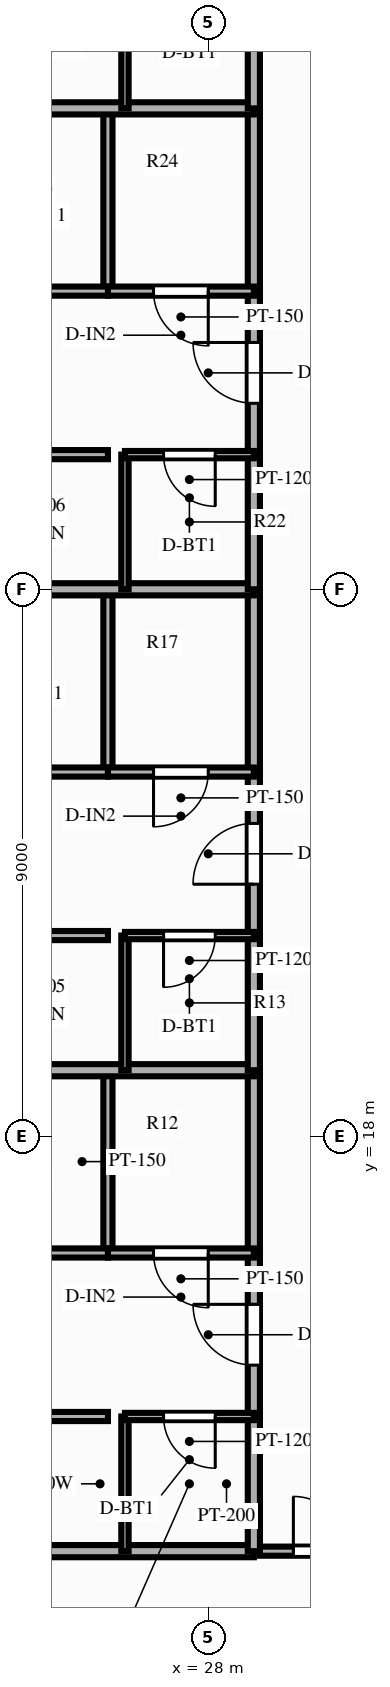
"""IFC4 building model, lengths in metres.
Left out: names, types, materials, properties, quantities, classifications, styles, units other than length and angle.
Written with IfcOpenShell. Run it as: python <this file> out.ifc"""

import sys

from ifc_helpers import new_model, si_unit, direction, frame, frame_2d, origin, place, context, subcontext, project, spatial, rectangle, extrude, source, transform, mapped, element, fill, save


model = new_model("IFC4")
c1 = context("Model", 3, precision=1e-05, world=origin(), true_north=direction((0.0, 1.0)))
c2 = subcontext(c1, "Body", "Model", "MODEL_VIEW")
j1 = project(units=[si_unit("LENGTHUNIT", "METRE"), si_unit("PLANEANGLEUNIT", "RADIAN")], contexts=[c1])
p1 = place(None, origin())
s1 = spatial("IfcSite", under=j1, at=p1, CompositionType="ELEMENT")
p2 = place(p1, origin())
s2 = spatial("IfcBuilding", under=s1, at=p2, CompositionType="ELEMENT")
p3 = place(p2, frame((0.0, 0.0, 189.7)))
s3 = spatial("IfcBuildingStorey", under=s2, at=p3, CompositionType="ELEMENT", Elevation=189.7)
p4 = place(p3, frame((28.85, 11.18, 0.0), z_axis=(0.0, 0.0, 1.0), x_axis=(1.0, 0.0, 0.0)))
e1 = element("IfcWall", 1, at=p4, inside=s3, PredefinedType="PARTITIONING", context=c2, shape_type="SweptSolid", body=[
    extrude(rectangle(XDim=2.33, YDim=0.15, at=frame_2d((1.165, 0.0))), origin(), (0.0, 0.0, 1.0), 2.79),
])
p5 = place(p4, frame((0.55, 0.0, 0.0)))
e2 = element("IfcOpeningElement", 2, at=p5, cuts=e1, PredefinedType="OPENING", context=c2, shape_type="SweptSolid", body=[
    extrude(rectangle(XDim=0.9, YDim=2.1, at=frame_2d((0.45, 1.05))), frame((0.0, 0.087, 0.0), z_axis=(0.0, -1.0, 0.0), x_axis=(1.0, 0.0, 0.0)), (0.0, 0.0, 1.0), 0.174),
])
p6 = place(p3, frame((28.75, 11.18, 0.0), z_axis=(0.0, 0.0, 1.0), x_axis=(-1.0, 0.0, 0.0)))
e3 = element("IfcWall", 3, at=p6, inside=s3, PredefinedType="PARTITIONING", context=c2, shape_type="SweptSolid", body=[
    extrude(rectangle(XDim=10.85, YDim=0.2, at=frame_2d((5.425, 0.0))), origin(), (0.0, 0.0, 1.0), 2.79),
])
p7 = place(p3, frame((28.75, 11.18, 0.0), z_axis=(0.0, 0.0, 1.0), x_axis=(0.0, 1.0, 0.0)))
e4 = element("IfcWall", 4, at=p7, inside=s3, PredefinedType="PARTITIONING", context=c2, shape_type="SweptSolid", body=[
    extrude(rectangle(XDim=2.215, YDim=0.2, at=frame_2d((1.107, 0.0))), origin(), (0.0, 0.0, 1.0), 2.79),
])
p8 = place(p3, frame((28.75, 13.395, 0.0), z_axis=(0.0, 0.0, 1.0), x_axis=(0.0, 1.0, 0.0)))
e5 = element("IfcWall", 5, at=p8, inside=s3, PredefinedType="PARTITIONING", context=c2, shape_type="SweptSolid", body=[
    extrude(rectangle(XDim=2.689, YDim=0.2, at=frame_2d((1.345, 0.0))), origin(), (0.0, 0.0, 1.0), 2.79),
])
p9 = place(p8, frame((0.845, 0.0, 0.0)))
e6 = element("IfcOpeningElement", 6, at=p9, cuts=e5, PredefinedType="OPENING", context=c2, shape_type="SweptSolid", body=[
    extrude(rectangle(XDim=1.0, YDim=2.15, at=frame_2d((0.5, 1.075))), frame((0.0, 0.112, 0.0), z_axis=(0.0, -1.0, 0.0), x_axis=(1.0, 0.0, 0.0)), (0.0, 0.0, 1.0), 0.224),
])
p10 = place(p3, frame((28.75, 16.084, 0.0), z_axis=(0.0, 0.0, 1.0), x_axis=(0.0, 1.0, 0.0)))
e7 = element("IfcWall", 7, at=p10, inside=s3, PredefinedType="PARTITIONING", context=c2, shape_type="SweptSolid", body=[
    extrude(rectangle(XDim=3.006, YDim=0.2, at=frame_2d((1.503, 0.0))), origin(), (0.0, 0.0, 1.0), 2.79),
])
p11 = place(p3, frame((26.63, 11.18, 0.0), z_axis=(0.0, 0.0, 1.0), x_axis=(0.0, 1.0, 0.0)))
e8 = element("IfcWall", 8, at=p11, inside=s3, PredefinedType="PARTITIONING", context=c2, shape_type="SweptSolid", body=[
    extrude(rectangle(XDim=2.215, YDim=0.12, at=frame_2d((1.107, 0.0))), origin(), (0.0, 0.0, 1.0), 2.79),
])
p12 = place(p3, frame((26.35, 16.084, 0.0), z_axis=(0.0, 0.0, 1.0), x_axis=(0.0, 1.0, 0.0)))
e9 = element("IfcWall", 9, at=p12, inside=s3, PredefinedType="PARTITIONING", context=c2, shape_type="SweptSolid", body=[
    extrude(rectangle(XDim=3.006, YDim=0.15, at=frame_2d((1.503, 0.0))), origin(), (0.0, 0.0, 1.0), 2.79),
])
p13 = place(p3, frame((28.75, 13.395, 0.0), z_axis=(0.0, 0.0, 1.0), x_axis=(-1.0, 0.0, 0.0)))
e10 = element("IfcWall", 10, at=p13, inside=s3, PredefinedType="PARTITIONING", context=c2, shape_type="SweptSolid", body=[
    extrude(rectangle(XDim=2.12, YDim=0.12, at=frame_2d((1.06, 0.0))), origin(), (0.0, 0.0, 1.0), 2.79),
])
p14 = place(p13, frame((0.635, 0.0, 0.0)))
e11 = element("IfcOpeningElement", 11, at=p14, cuts=e10, PredefinedType="OPENING", context=c2, shape_type="SweptSolid", body=[
    extrude(rectangle(XDim=0.85, YDim=2.05, at=frame_2d((0.425, 1.025))), frame((0.0, 0.072, 0.0), z_axis=(0.0, -1.0, 0.0), x_axis=(1.0, 0.0, 0.0)), (0.0, 0.0, 1.0), 0.144),
])
p15 = place(p3, frame((26.35, 13.395, 0.0), z_axis=(0.0, 0.0, 1.0), x_axis=(-1.0, 0.0, 0.0)))
e12 = element("IfcWall", 12, at=p15, inside=s3, PredefinedType="PARTITIONING", context=c2, shape_type="SweptSolid", body=[
    extrude(rectangle(XDim=8.45, YDim=0.15, at=frame_2d((4.225, 0.0))), origin(), (0.0, 0.0, 1.0), 2.79),
])
p16 = place(p15, frame((3.48, 0.0, 0.0)))
e13 = element("IfcOpeningElement", 13, at=p16, cuts=e12, PredefinedType="OPENING", context=c2, shape_type="SweptSolid", body=[
    extrude(rectangle(XDim=0.9, YDim=2.1, at=frame_2d((0.45, 1.05))), frame((0.0, 0.087, 0.0), z_axis=(0.0, -1.0, 0.0), x_axis=(1.0, 0.0, 0.0)), (0.0, 0.0, 1.0), 0.174),
])
p17 = place(p3, frame((28.75, 16.084, 0.0), z_axis=(0.0, 0.0, 1.0), x_axis=(-1.0, 0.0, 0.0)))
e14 = element("IfcWall", 14, at=p17, inside=s3, PredefinedType="PARTITIONING", context=c2, shape_type="SweptSolid", body=[
    extrude(rectangle(XDim=2.4, YDim=0.15, at=frame_2d((1.2, 0.0))), origin(), (0.0, 0.0, 1.0), 2.79),
])
p18 = place(p17, frame((0.75, 0.0, 0.0)))
e15 = element("IfcOpeningElement", 15, at=p18, cuts=e14, PredefinedType="OPENING", context=c2, shape_type="SweptSolid", body=[
    extrude(rectangle(XDim=0.9, YDim=2.1, at=frame_2d((0.45, 1.05))), frame((0.0, 0.087, 0.0), z_axis=(0.0, -1.0, 0.0), x_axis=(1.0, 0.0, 0.0)), (0.0, 0.0, 1.0), 0.174),
])
p19 = place(p3, frame((26.35, 16.084, 0.0), z_axis=(0.0, 0.0, 1.0), x_axis=(-1.0, 0.0, 0.0)))
e16 = element("IfcWall", 16, at=p19, inside=s3, PredefinedType="PARTITIONING", context=c2, shape_type="SweptSolid", body=[
    extrude(rectangle(XDim=8.45, YDim=0.15, at=frame_2d((4.225, 0.0))), origin(), (0.0, 0.0, 1.0), 2.79),
])
p20 = place(p19, frame((3.48, 0.0, 0.0)))
e17 = element("IfcOpeningElement", 17, at=p20, cuts=e16, PredefinedType="OPENING", context=c2, shape_type="SweptSolid", body=[
    extrude(rectangle(XDim=0.9, YDim=2.1, at=frame_2d((0.45, 1.05))), frame((0.0, 0.087, 0.0), z_axis=(0.0, -1.0, 0.0), x_axis=(1.0, 0.0, 0.0)), (0.0, 0.0, 1.0), 0.174),
])
p21 = place(p3, frame((28.75, 19.09, 0.0), z_axis=(0.0, 0.0, 1.0), x_axis=(-1.0, 0.0, 0.0)))
e18 = element("IfcWall", 18, at=p21, inside=s3, PredefinedType="PARTITIONING", context=c2, shape_type="SweptSolid", body=[
    extrude(rectangle(XDim=10.85, YDim=0.2, at=frame_2d((5.425, 0.0))), origin(), (0.0, 0.0, 1.0), 2.79),
])
p22 = place(p3, frame((28.75, 19.09, 0.0), z_axis=(0.0, 0.0, 1.0), x_axis=(0.0, 1.0, 0.0)))
e19 = element("IfcWall", 19, at=p22, inside=s3, PredefinedType="PARTITIONING", context=c2, shape_type="SweptSolid", body=[
    extrude(rectangle(XDim=2.215, YDim=0.2, at=frame_2d((1.107, 0.0))), origin(), (0.0, 0.0, 1.0), 2.79),
])
p23 = place(p3, frame((28.75, 21.305, 0.0), z_axis=(0.0, 0.0, 1.0), x_axis=(0.0, 1.0, 0.0)))
e20 = element("IfcWall", 20, at=p23, inside=s3, PredefinedType="PARTITIONING", context=c2, shape_type="SweptSolid", body=[
    extrude(rectangle(XDim=2.689, YDim=0.2, at=frame_2d((1.345, 0.0))), origin(), (0.0, 0.0, 1.0), 2.79),
])
p24 = place(p23, frame((0.845, 0.0, 0.0)))
e21 = element("IfcOpeningElement", 21, at=p24, cuts=e20, PredefinedType="OPENING", context=c2, shape_type="SweptSolid", body=[
    extrude(rectangle(XDim=1.0, YDim=2.15, at=frame_2d((0.5, 1.075))), frame((0.0, 0.112, 0.0), z_axis=(0.0, -1.0, 0.0), x_axis=(1.0, 0.0, 0.0)), (0.0, 0.0, 1.0), 0.224),
])
p25 = place(p3, frame((28.75, 23.994, 0.0), z_axis=(0.0, 0.0, 1.0), x_axis=(0.0, 1.0, 0.0)))
e22 = element("IfcWall", 22, at=p25, inside=s3, PredefinedType="PARTITIONING", context=c2, shape_type="SweptSolid", body=[
    extrude(rectangle(XDim=3.006, YDim=0.2, at=frame_2d((1.503, 0.0))), origin(), (0.0, 0.0, 1.0), 2.79),
])
p26 = place(p3, frame((26.63, 19.09, 0.0), z_axis=(0.0, 0.0, 1.0), x_axis=(0.0, 1.0, 0.0)))
e23 = element("IfcWall", 23, at=p26, inside=s3, PredefinedType="PARTITIONING", context=c2, shape_type="SweptSolid", body=[
    extrude(rectangle(XDim=2.215, YDim=0.12, at=frame_2d((1.107, 0.0))), origin(), (0.0, 0.0, 1.0), 2.79),
])
p27 = place(p3, frame((26.35, 23.994, 0.0), z_axis=(0.0, 0.0, 1.0), x_axis=(0.0, 1.0, 0.0)))
e24 = element("IfcWall", 24, at=p27, inside=s3, PredefinedType="PARTITIONING", context=c2, shape_type="SweptSolid", body=[
    extrude(rectangle(XDim=3.006, YDim=0.15, at=frame_2d((1.503, 0.0))), origin(), (0.0, 0.0, 1.0), 2.79),
])
p28 = place(p3, frame((28.75, 21.305, 0.0), z_axis=(0.0, 0.0, 1.0), x_axis=(-1.0, 0.0, 0.0)))
e25 = element("IfcWall", 25, at=p28, inside=s3, PredefinedType="PARTITIONING", context=c2, shape_type="SweptSolid", body=[
    extrude(rectangle(XDim=2.12, YDim=0.12, at=frame_2d((1.06, 0.0))), origin(), (0.0, 0.0, 1.0), 2.79),
])
p29 = place(p28, frame((0.635, 0.0, 0.0)))
e26 = element("IfcOpeningElement", 26, at=p29, cuts=e25, PredefinedType="OPENING", context=c2, shape_type="SweptSolid", body=[
    extrude(rectangle(XDim=0.85, YDim=2.05, at=frame_2d((0.425, 1.025))), frame((0.0, 0.072, 0.0), z_axis=(0.0, -1.0, 0.0), x_axis=(1.0, 0.0, 0.0)), (0.0, 0.0, 1.0), 0.144),
])
p30 = place(p3, frame((26.35, 21.305, 0.0), z_axis=(0.0, 0.0, 1.0), x_axis=(-1.0, 0.0, 0.0)))
e27 = element("IfcWall", 27, at=p30, inside=s3, PredefinedType="PARTITIONING", context=c2, shape_type="SweptSolid", body=[
    extrude(rectangle(XDim=8.45, YDim=0.15, at=frame_2d((4.225, 0.0))), origin(), (0.0, 0.0, 1.0), 2.79),
])
p31 = place(p30, frame((3.48, 0.0, 0.0)))
e28 = element("IfcOpeningElement", 28, at=p31, cuts=e27, PredefinedType="OPENING", context=c2, shape_type="SweptSolid", body=[
    extrude(rectangle(XDim=0.9, YDim=2.1, at=frame_2d((0.45, 1.05))), frame((0.0, 0.087, 0.0), z_axis=(0.0, -1.0, 0.0), x_axis=(1.0, 0.0, 0.0)), (0.0, 0.0, 1.0), 0.174),
])
p32 = place(p3, frame((28.75, 23.994, 0.0), z_axis=(0.0, 0.0, 1.0), x_axis=(-1.0, 0.0, 0.0)))
e29 = element("IfcWall", 29, at=p32, inside=s3, PredefinedType="PARTITIONING", context=c2, shape_type="SweptSolid", body=[
    extrude(rectangle(XDim=2.4, YDim=0.15, at=frame_2d((1.2, 0.0))), origin(), (0.0, 0.0, 1.0), 2.79),
])
p33 = place(p32, frame((0.75, 0.0, 0.0)))
e30 = element("IfcOpeningElement", 30, at=p33, cuts=e29, PredefinedType="OPENING", context=c2, shape_type="SweptSolid", body=[
    extrude(rectangle(XDim=0.9, YDim=2.1, at=frame_2d((0.45, 1.05))), frame((0.0, 0.087, 0.0), z_axis=(0.0, -1.0, 0.0), x_axis=(1.0, 0.0, 0.0)), (0.0, 0.0, 1.0), 0.174),
])
p34 = place(p3, frame((26.35, 23.994, 0.0), z_axis=(0.0, 0.0, 1.0), x_axis=(-1.0, 0.0, 0.0)))
e31 = element("IfcWall", 31, at=p34, inside=s3, PredefinedType="PARTITIONING", context=c2, shape_type="SweptSolid", body=[
    extrude(rectangle(XDim=8.45, YDim=0.15, at=frame_2d((4.225, 0.0))), origin(), (0.0, 0.0, 1.0), 2.79),
])
p35 = place(p34, frame((3.48, 0.0, 0.0)))
e32 = element("IfcOpeningElement", 32, at=p35, cuts=e31, PredefinedType="OPENING", context=c2, shape_type="SweptSolid", body=[
    extrude(rectangle(XDim=0.9, YDim=2.1, at=frame_2d((0.45, 1.05))), frame((0.0, 0.087, 0.0), z_axis=(0.0, -1.0, 0.0), x_axis=(1.0, 0.0, 0.0)), (0.0, 0.0, 1.0), 0.174),
])
p36 = place(p3, frame((28.75, 27.0, 0.0), z_axis=(0.0, 0.0, 1.0), x_axis=(-1.0, 0.0, 0.0)))
e33 = element("IfcWall", 33, at=p36, inside=s3, PredefinedType="PARTITIONING", context=c2, shape_type="SweptSolid", body=[
    extrude(rectangle(XDim=10.85, YDim=0.2, at=frame_2d((5.425, 0.0))), origin(), (0.0, 0.0, 1.0), 2.79),
])
p37 = place(p3, frame((28.75, 27.0, 0.0), z_axis=(0.0, 0.0, 1.0), x_axis=(0.0, 1.0, 0.0)))
e34 = element("IfcWall", 34, at=p37, inside=s3, PredefinedType="PARTITIONING", context=c2, shape_type="SweptSolid", body=[
    extrude(rectangle(XDim=2.215, YDim=0.2, at=frame_2d((1.107, 0.0))), origin(), (0.0, 0.0, 1.0), 2.79),
])
p38 = place(p3, frame((28.75, 29.215, 0.0), z_axis=(0.0, 0.0, 1.0), x_axis=(0.0, 1.0, 0.0)))
e35 = element("IfcWall", 35, at=p38, inside=s3, PredefinedType="PARTITIONING", context=c2, shape_type="SweptSolid", body=[
    extrude(rectangle(XDim=2.689, YDim=0.2, at=frame_2d((1.345, 0.0))), origin(), (0.0, 0.0, 1.0), 2.79),
])
p39 = place(p38, frame((0.845, 0.0, 0.0)))
e36 = element("IfcOpeningElement", 36, at=p39, cuts=e35, PredefinedType="OPENING", context=c2, shape_type="SweptSolid", body=[
    extrude(rectangle(XDim=1.0, YDim=2.15, at=frame_2d((0.5, 1.075))), frame((0.0, 0.112, 0.0), z_axis=(0.0, -1.0, 0.0), x_axis=(1.0, 0.0, 0.0)), (0.0, 0.0, 1.0), 0.224),
])
p40 = place(p3, frame((28.75, 31.904, 0.0), z_axis=(0.0, 0.0, 1.0), x_axis=(0.0, 1.0, 0.0)))
e37 = element("IfcWall", 37, at=p40, inside=s3, PredefinedType="PARTITIONING", context=c2, shape_type="SweptSolid", body=[
    extrude(rectangle(XDim=3.006, YDim=0.2, at=frame_2d((1.503, 0.0))), origin(), (0.0, 0.0, 1.0), 2.79),
])
p41 = place(p3, frame((26.63, 27.0, 0.0), z_axis=(0.0, 0.0, 1.0), x_axis=(0.0, 1.0, 0.0)))
e38 = element("IfcWall", 38, at=p41, inside=s3, PredefinedType="PARTITIONING", context=c2, shape_type="SweptSolid", body=[
    extrude(rectangle(XDim=2.215, YDim=0.12, at=frame_2d((1.107, 0.0))), origin(), (0.0, 0.0, 1.0), 2.79),
])
p42 = place(p3, frame((26.35, 31.904, 0.0), z_axis=(0.0, 0.0, 1.0), x_axis=(0.0, 1.0, 0.0)))
e39 = element("IfcWall", 39, at=p42, inside=s3, PredefinedType="PARTITIONING", context=c2, shape_type="SweptSolid", body=[
    extrude(rectangle(XDim=3.006, YDim=0.15, at=frame_2d((1.503, 0.0))), origin(), (0.0, 0.0, 1.0), 2.79),
])
p43 = place(p3, frame((28.75, 29.215, 0.0), z_axis=(0.0, 0.0, 1.0), x_axis=(-1.0, 0.0, 0.0)))
e40 = element("IfcWall", 40, at=p43, inside=s3, PredefinedType="PARTITIONING", context=c2, shape_type="SweptSolid", body=[
    extrude(rectangle(XDim=2.12, YDim=0.12, at=frame_2d((1.06, 0.0))), origin(), (0.0, 0.0, 1.0), 2.79),
])
p44 = place(p43, frame((0.635, 0.0, 0.0)))
e41 = element("IfcOpeningElement", 41, at=p44, cuts=e40, PredefinedType="OPENING", context=c2, shape_type="SweptSolid", body=[
    extrude(rectangle(XDim=0.85, YDim=2.05, at=frame_2d((0.425, 1.025))), frame((0.0, 0.072, 0.0), z_axis=(0.0, -1.0, 0.0), x_axis=(1.0, 0.0, 0.0)), (0.0, 0.0, 1.0), 0.144),
])
p45 = place(p3, frame((26.35, 29.215, 0.0), z_axis=(0.0, 0.0, 1.0), x_axis=(-1.0, 0.0, 0.0)))
e42 = element("IfcWall", 42, at=p45, inside=s3, PredefinedType="PARTITIONING", context=c2, shape_type="SweptSolid", body=[
    extrude(rectangle(XDim=8.45, YDim=0.15, at=frame_2d((4.225, 0.0))), origin(), (0.0, 0.0, 1.0), 2.79),
])
p46 = place(p45, frame((3.48, 0.0, 0.0)))
e43 = element("IfcOpeningElement", 43, at=p46, cuts=e42, PredefinedType="OPENING", context=c2, shape_type="SweptSolid", body=[
    extrude(rectangle(XDim=0.9, YDim=2.1, at=frame_2d((0.45, 1.05))), frame((0.0, 0.087, 0.0), z_axis=(0.0, -1.0, 0.0), x_axis=(1.0, 0.0, 0.0)), (0.0, 0.0, 1.0), 0.174),
])
p47 = place(p3, frame((28.75, 31.904, 0.0), z_axis=(0.0, 0.0, 1.0), x_axis=(-1.0, 0.0, 0.0)))
e44 = element("IfcWall", 44, at=p47, inside=s3, PredefinedType="PARTITIONING", context=c2, shape_type="SweptSolid", body=[
    extrude(rectangle(XDim=2.4, YDim=0.15, at=frame_2d((1.2, 0.0))), origin(), (0.0, 0.0, 1.0), 2.39),
])
p48 = place(p47, frame((0.75, 0.0, 0.0)))
e45 = element("IfcOpeningElement", 45, at=p48, cuts=e44, PredefinedType="OPENING", context=c2, shape_type="SweptSolid", body=[
    extrude(rectangle(XDim=0.9, YDim=2.1, at=frame_2d((0.45, 1.05))), frame((0.0, 0.087, 0.0), z_axis=(0.0, -1.0, 0.0), x_axis=(1.0, 0.0, 0.0)), (0.0, 0.0, 1.0), 0.174),
])
p49 = place(p3, frame((26.35, 31.904, 0.0), z_axis=(0.0, 0.0, 1.0), x_axis=(-1.0, 0.0, 0.0)))
e46 = element("IfcWall", 46, at=p49, inside=s3, PredefinedType="PARTITIONING", context=c2, shape_type="SweptSolid", body=[
    extrude(rectangle(XDim=8.45, YDim=0.15, at=frame_2d((4.225, 0.0))), origin(), (0.0, 0.0, 1.0), 2.39),
])
p50 = place(p49, frame((3.48, 0.0, 0.0)))
e47 = element("IfcOpeningElement", 47, at=p50, cuts=e46, PredefinedType="OPENING", context=c2, shape_type="SweptSolid", body=[
    extrude(rectangle(XDim=0.9, YDim=2.1, at=frame_2d((0.45, 1.05))), frame((0.0, 0.087, 0.0), z_axis=(0.0, -1.0, 0.0), x_axis=(1.0, 0.0, 0.0)), (0.0, 0.0, 1.0), 0.174),
])
p51 = place(p3, frame((28.75, 34.91, 0.0), z_axis=(0.0, 0.0, 1.0), x_axis=(-1.0, 0.0, 0.0)))
e48 = element("IfcWall", 48, at=p51, inside=s3, PredefinedType="PARTITIONING", context=c2, shape_type="SweptSolid", body=[
    extrude(rectangle(XDim=10.85, YDim=0.2, at=frame_2d((5.425, 0.0))), origin(), (0.0, 0.0, 1.0), 2.79),
])
p52 = place(p3, frame((28.75, 34.91, 0.0), z_axis=(0.0, 0.0, 1.0), x_axis=(0.0, 1.0, 0.0)))
e49 = element("IfcWall", 49, at=p52, inside=s3, PredefinedType="PARTITIONING", context=c2, shape_type="SweptSolid", body=[
    extrude(rectangle(XDim=2.41, YDim=0.2, at=frame_2d((1.205, 0.0))), origin(), (0.0, 0.0, 1.0), 2.79),
])
p53 = place(p3, frame((26.63, 34.91, 0.0), z_axis=(0.0, 0.0, 1.0), x_axis=(0.0, 1.0, 0.0)))
e50 = element("IfcWall", 50, at=p53, inside=s3, PredefinedType="PARTITIONING", context=c2, shape_type="SweptSolid", body=[
    extrude(rectangle(XDim=2.41, YDim=0.12, at=frame_2d((1.205, 0.0))), origin(), (0.0, 0.0, 1.0), 2.79),
])
m1 = source(origin(), c2, "Body", "SweptSolid", [
    extrude(rectangle(XDim=0.9, YDim=2.1, at=frame_2d((0.45, 1.05))), frame((0.0, 0.025, 0.0), z_axis=(0.0, -1.0, 0.0), x_axis=(1.0, 0.0, 0.0)), (0.0, 0.0, 1.0), 0.05),
])
p54 = place(p5, origin())
e51 = element("IfcDoor", 51, at=p54, inside=s3, OperationType="SINGLE_SWING_LEFT", PredefinedType="DOOR", context=c2, shape_type="MappedRepresentation", body=[
    mapped(m1, transform((0.0, 0.0, 0.0), scale=1.0)),
])
fill(e2, e51)
m2 = source(origin(), c2, "Body", "SweptSolid", [
    extrude(rectangle(XDim=1.0, YDim=2.15, at=frame_2d((0.5, 1.075))), frame((0.0, 0.025, 0.0), z_axis=(0.0, -1.0, 0.0), x_axis=(1.0, 0.0, 0.0)), (0.0, 0.0, 1.0), 0.05),
])
p55 = place(p9, origin())
e52 = element("IfcDoor", 52, at=p55, inside=s3, OperationType="SINGLE_SWING_RIGHT", PredefinedType="DOOR", context=c2, shape_type="MappedRepresentation", body=[
    mapped(m2, transform((0.0, 0.0, 0.0), scale=1.0)),
])
fill(e6, e52)
m3 = source(origin(), c2, "Body", "SweptSolid", [
    extrude(rectangle(XDim=0.85, YDim=2.05, at=frame_2d((0.425, 1.025))), frame((0.0, 0.025, 0.0), z_axis=(0.0, -1.0, 0.0), x_axis=(1.0, 0.0, 0.0)), (0.0, 0.0, 1.0), 0.05),
])
p56 = place(p14, origin())
e53 = element("IfcDoor", 53, at=p56, inside=s3, OperationType="SINGLE_SWING_LEFT", PredefinedType="DOOR", context=c2, shape_type="MappedRepresentation", body=[
    mapped(m3, transform((0.0, 0.0, 0.0), scale=1.0)),
])
fill(e11, e53)
p57 = place(p18, origin())
e54 = element("IfcDoor", 54, at=p57, inside=s3, OperationType="SINGLE_SWING_LEFT", PredefinedType="DOOR", context=c2, shape_type="MappedRepresentation", body=[
    mapped(m1, transform((0.0, 0.0, 0.0), scale=1.0)),
])
fill(e15, e54)
p58 = place(p24, origin())
e55 = element("IfcDoor", 55, at=p58, inside=s3, OperationType="SINGLE_SWING_LEFT", PredefinedType="DOOR", context=c2, shape_type="MappedRepresentation", body=[
    mapped(m2, transform((0.0, 0.0, 0.0), scale=1.0)),
])
fill(e21, e55)
p59 = place(p29, origin())
e56 = element("IfcDoor", 56, at=p59, inside=s3, OperationType="SINGLE_SWING_RIGHT", PredefinedType="DOOR", context=c2, shape_type="MappedRepresentation", body=[
    mapped(m3, transform((0.0, 0.0, 0.0), scale=1.0)),
])
fill(e26, e56)
p60 = place(p33, origin())
e57 = element("IfcDoor", 57, at=p60, inside=s3, OperationType="SINGLE_SWING_RIGHT", PredefinedType="DOOR", context=c2, shape_type="MappedRepresentation", body=[
    mapped(m1, transform((0.0, 0.0, 0.0), scale=1.0)),
])
fill(e30, e57)
p61 = place(p39, origin())
e58 = element("IfcDoor", 58, at=p61, inside=s3, OperationType="SINGLE_SWING_RIGHT", PredefinedType="DOOR", context=c2, shape_type="MappedRepresentation", body=[
    mapped(m2, transform((0.0, 0.0, 0.0), scale=1.0)),
])
fill(e36, e58)
p62 = place(p44, origin())
e59 = element("IfcDoor", 59, at=p62, inside=s3, OperationType="SINGLE_SWING_LEFT", PredefinedType="DOOR", context=c2, shape_type="MappedRepresentation", body=[
    mapped(m3, transform((0.0, 0.0, 0.0), scale=1.0)),
])
fill(e41, e59)
p63 = place(p48, origin())
e60 = element("IfcDoor", 60, at=p63, inside=s3, OperationType="SINGLE_SWING_LEFT", PredefinedType="DOOR", context=c2, shape_type="MappedRepresentation", body=[
    mapped(m1, transform((0.0, 0.0, 0.0), scale=1.0)),
])
fill(e45, e60)
save(model, sys.argv[1])
